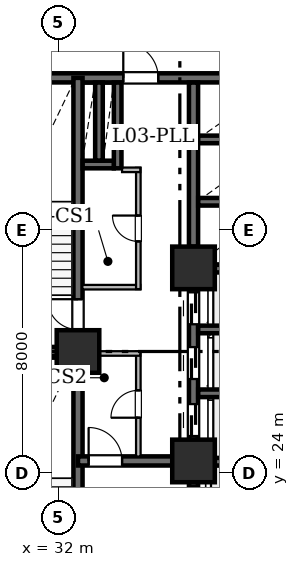
"""IFC4 building model, lengths in metres.
Left out: names, types, materials, properties, quantities, classifications, styles, units other than length and angle.
Written with IfcOpenShell. Run it as: python <this file> out.ifc"""

import sys

from ifc_helpers import new_model, si_unit, direction, frame, frame_2d, origin, origin_2d, place, context, subcontext, project, spatial, rectangle, hollow_rectangle, extrude, element, fill, save


model = new_model("IFC4")
c1 = context("Model", 3, precision=1e-05, world=origin(), true_north=direction((0.0, 1.0)))
c2 = subcontext(c1, "Body", "Model", "MODEL_VIEW")
j1 = project(units=[si_unit("LENGTHUNIT", "METRE"), si_unit("PLANEANGLEUNIT", "RADIAN")], contexts=[c1])
p1 = place(None, origin())
s1 = spatial("IfcSite", under=j1, at=p1, CompositionType="ELEMENT")
p2 = place(p1, origin())
s2 = spatial("IfcBuilding", under=s1, at=p2, CompositionType="ELEMENT")
p3 = place(p2, frame((0.0, 0.0, 16.2)))
s3 = spatial("IfcBuildingStorey", under=s2, at=p3, CompositionType="ELEMENT", Elevation=16.2)
for number, where, z_axis, x_axis in (
    (1, (32.65, 28.0, 0.0), (0.0, 0.0, 1.0), (1.0, 0.0, 0.0)),
    (2, (36.45, 24.4, 0.0), (0.0, 0.0, 1.0), (1.0, 0.0, 0.0)),
    (3, (36.45, 30.75, 0.0), (0.0, 0.0, 1.0), (1.0, 0.0, 0.0)),
):
    element("IfcColumn", number, at=place(p3, frame(where, z_axis=z_axis, x_axis=x_axis)), inside=s3, PredefinedType="COLUMN", context=c2, shape_type="SweptSolid", body=[
        extrude(hollow_rectangle(XDim=1.4, YDim=1.4, WallThickness=0.07, at=origin_2d()), origin(), (0.0, 0.0, 1.0), 4.2),
    ])
p4 = place(p3, frame((29.0, 37.0, 0.0), z_axis=(0.0, 0.0, 1.0), x_axis=(1.0, 0.0, 0.0)))
e4 = element("IfcWall", 4, at=p4, inside=s3, PredefinedType="SHEAR", context=c2, shape_type="SweptSolid", body=[
    extrude(rectangle(XDim=10.4, YDim=0.3, at=frame_2d((5.2, 0.0))), origin(), (0.0, 0.0, 1.0), 3.92),
])
p5 = place(p4, frame((5.14, 0.0, 0.0)))
e5 = element("IfcOpeningElement", 5, at=p5, cuts=e4, PredefinedType="OPENING", context=c2, shape_type="SweptSolid", body=[
    extrude(rectangle(XDim=1.15, YDim=2.2, at=frame_2d((0.575, 1.1))), frame((0.0, 0.16, 0.0), z_axis=(0.0, -1.0, 0.0), x_axis=(1.0, 0.0, 0.0)), (0.0, 0.0, 1.0), 0.32),
])
p6 = place(p3, frame((32.65, 19.0, 0.0), z_axis=(0.0, 0.0, 1.0), x_axis=(0.0, 1.0, 0.0)))
e6 = element("IfcWall", 6, at=p6, inside=s3, PredefinedType="SHEAR", context=c2, shape_type="SweptSolid", body=[
    extrude(rectangle(XDim=9.0, YDim=0.3, at=frame_2d((4.5, 0.0))), origin(), (0.0, 0.0, 1.0), 3.92),
])
p7 = place(p6, frame((0.72, 0.0, 0.0)))
e7 = element("IfcOpeningElement", 7, at=p7, cuts=e6, PredefinedType="OPENING", context=c2, shape_type="SweptSolid", body=[
    extrude(rectangle(XDim=1.0, YDim=2.15, at=frame_2d((0.5, 1.075))), frame((0.0, 0.16, 0.0), z_axis=(0.0, -1.0, 0.0), x_axis=(1.0, 0.0, 0.0)), (0.0, 0.0, 1.0), 0.32),
])
p8 = place(p3, frame((32.65, 28.0, 0.0), z_axis=(0.0, 0.0, 1.0), x_axis=(0.0, 1.0, 0.0)))
e8 = element("IfcWall", 8, at=p8, inside=s3, PredefinedType="SHEAR", context=c2, shape_type="SweptSolid", body=[
    extrude(rectangle(XDim=9.0, YDim=0.3, at=frame_2d((4.5, 0.0))), origin(), (0.0, 0.0, 1.0), 3.92),
])
p9 = place(p8, frame((0.72, 0.0, 0.0)))
e9 = element("IfcOpeningElement", 9, at=p9, cuts=e8, PredefinedType="OPENING", context=c2, shape_type="SweptSolid", body=[
    extrude(rectangle(XDim=1.0, YDim=2.15, at=frame_2d((0.5, 1.075))), frame((0.0, 0.16, 0.0), z_axis=(0.0, -1.0, 0.0), x_axis=(1.0, 0.0, 0.0)), (0.0, 0.0, 1.0), 0.32),
])
p10 = place(p3, frame((29.0, 28.0, 0.0), z_axis=(0.0, 0.0, 1.0), x_axis=(1.0, 0.0, 0.0)))
e10 = element("IfcWall", 10, at=p10, inside=s3, PredefinedType="SHEAR", context=c2, shape_type="SweptSolid", body=[
    extrude(rectangle(XDim=3.65, YDim=0.3, at=frame_2d((1.825, 0.0))), origin(), (0.0, 0.0, 1.0), 3.92),
])
p11 = place(p3, frame((32.65, 24.4, 0.0), z_axis=(0.0, 0.0, 1.0), x_axis=(1.0, 0.0, 0.0)))
e11 = element("IfcWall", 11, at=p11, inside=s3, PredefinedType="SHEAR", context=c2, shape_type="SweptSolid", body=[
    extrude(rectangle(XDim=3.8, YDim=0.3, at=frame_2d((1.9, 0.0))), origin(), (0.0, 0.0, 1.0), 3.92),
])
p12 = place(p11, frame((0.35, 0.0, 0.0)))
e12 = element("IfcOpeningElement", 12, at=p12, cuts=e11, PredefinedType="OPENING", context=c2, shape_type="SweptSolid", body=[
    extrude(rectangle(XDim=1.1, YDim=2.15, at=frame_2d((0.55, 1.075))), frame((0.0, 0.16, 0.0), z_axis=(0.0, -1.0, 0.0), x_axis=(1.0, 0.0, 0.0)), (0.0, 0.0, 1.0), 0.32),
])
p13 = place(p3, frame((36.45, 19.154, 0.0), z_axis=(0.0, 0.0, 1.0), x_axis=(0.0, 1.0, 0.0)))
e13 = element("IfcWall", 13, at=p13, inside=s3, PredefinedType="SHEAR", context=c2, shape_type="SweptSolid", body=[
    extrude(rectangle(XDim=4.546, YDim=0.3, at=frame_2d((2.273, 0.0))), origin(), (0.0, 0.0, 1.0), 3.92),
])
p14 = place(p13, frame((0.696, 0.0, 0.0)))
e14 = element("IfcOpeningElement", 14, at=p14, cuts=e13, PredefinedType="OPENING", context=c2, shape_type="SweptSolid", body=[
    extrude(rectangle(XDim=1.1, YDim=2.15, at=frame_2d((0.55, 1.075))), frame((0.0, 0.16, 0.0), z_axis=(0.0, -1.0, 0.0), x_axis=(1.0, 0.0, 0.0)), (0.0, 0.0, 1.0), 0.32),
])
p15 = place(p13, frame((3.316, 0.0, 0.0)))
e15 = element("IfcOpeningElement", 15, at=p15, cuts=e13, PredefinedType="OPENING", context=c2, shape_type="SweptSolid", body=[
    extrude(rectangle(XDim=1.1, YDim=2.15, at=frame_2d((0.55, 1.075))), frame((0.0, 0.16, 0.0), z_axis=(0.0, -1.0, 0.0), x_axis=(1.0, 0.0, 0.0)), (0.0, 0.0, 1.0), 0.32),
])
p16 = place(p3, frame((36.45, 25.1, 0.0), z_axis=(0.0, 0.0, 1.0), x_axis=(0.0, 1.0, 0.0)))
e16 = element("IfcWall", 16, at=p16, inside=s3, PredefinedType="SHEAR", context=c2, shape_type="SweptSolid", body=[
    extrude(rectangle(XDim=4.95, YDim=0.3, at=frame_2d((2.475, 0.0))), origin(), (0.0, 0.0, 1.0), 3.92),
])
p17 = place(p16, frame((0.12, 0.0, 0.0)))
e17 = element("IfcOpeningElement", 17, at=p17, cuts=e16, PredefinedType="OPENING", context=c2, shape_type="SweptSolid", body=[
    extrude(rectangle(XDim=1.05, YDim=2.15, at=frame_2d((0.525, 1.075))), frame((0.0, 0.16, 0.0), z_axis=(0.0, -1.0, 0.0), x_axis=(1.0, 0.0, 0.0)), (0.0, 0.0, 1.0), 0.32),
])
p18 = place(p16, frame((1.995, 0.0, 0.0)))
e18 = element("IfcOpeningElement", 18, at=p18, cuts=e16, PredefinedType="OPENING", context=c2, shape_type="SweptSolid", body=[
    extrude(rectangle(XDim=1.05, YDim=2.15, at=frame_2d((0.525, 1.075))), frame((0.0, 0.16, 0.0), z_axis=(0.0, -1.0, 0.0), x_axis=(1.0, 0.0, 0.0)), (0.0, 0.0, 1.0), 0.32),
])
p19 = place(p16, frame((3.795, 0.0, 0.0)))
e19 = element("IfcOpeningElement", 19, at=p19, cuts=e16, PredefinedType="OPENING", context=c2, shape_type="SweptSolid", body=[
    extrude(rectangle(XDim=1.05, YDim=2.15, at=frame_2d((0.525, 1.075))), frame((0.0, 0.16, 0.0), z_axis=(0.0, -1.0, 0.0), x_axis=(1.0, 0.0, 0.0)), (0.0, 0.0, 1.0), 0.32),
])
p20 = place(p3, frame((36.45, 31.45, 0.0), z_axis=(0.0, 0.0, 1.0), x_axis=(0.0, 1.0, 0.0)))
e20 = element("IfcWall", 20, at=p20, inside=s3, PredefinedType="SHEAR", context=c2, shape_type="SweptSolid", body=[
    extrude(rectangle(XDim=5.396, YDim=0.3, at=frame_2d((2.698, 0.0))), origin(), (0.0, 0.0, 1.0), 3.92),
])
for number, where, z_axis, x_axis in (
    (21, (36.604, 24.375, 0.0), (0.0, 0.0, 1.0), (1.0, 0.0, 0.0)),
    (22, (36.604, 26.625, 0.0), (0.0, 0.0, 1.0), (1.0, 0.0, 0.0)),
    (23, (36.604, 28.725, 0.0), (0.0, 0.0, 1.0), (1.0, 0.0, 0.0)),
    (24, (36.604, 30.725, 0.0), (0.0, 0.0, 1.0), (1.0, 0.0, 0.0)),
    (25, (36.604, 32.925, 0.0), (0.0, 0.0, 1.0), (1.0, 0.0, 0.0)),
    (26, (36.604, 34.975, 0.0), (0.0, 0.0, 1.0), (1.0, 0.0, 0.0)),
):
    element("IfcWall", number, at=place(p3, frame(where, z_axis=z_axis, x_axis=x_axis)), inside=s3, PredefinedType="SHEAR", context=c2, shape_type="SweptSolid", body=[
        extrude(rectangle(XDim=2.642, YDim=0.25, at=frame_2d((1.321, 0.0))), origin(), (0.0, 0.0, 1.0), 3.92),
    ])
p21 = place(p3, frame((33.955, 34.025, 0.0), z_axis=(0.0, 0.0, 1.0), x_axis=(0.0, 1.0, 0.0)))
e27 = element("IfcWall", 27, at=p21, inside=s3, PredefinedType="SHEAR", context=c2, shape_type="SweptSolid", body=[
    extrude(rectangle(XDim=2.821, YDim=0.25, at=frame_2d((1.411, 0.0))), origin(), (0.0, 0.0, 1.0), 3.92),
])
p22 = place(p3, frame((32.804, 34.15, 0.0), z_axis=(0.0, 0.0, 1.0), x_axis=(1.0, 0.0, 0.0)))
e28 = element("IfcWall", 28, at=p22, inside=s3, PredefinedType="SHEAR", context=c2, shape_type="SweptSolid", body=[
    extrude(rectangle(XDim=1.022, YDim=0.25, at=frame_2d((0.511, 0.0))), origin(), (0.0, 0.0, 1.0), 3.92),
])
p23 = place(p3, frame((33.34, 34.279, 0.0), z_axis=(0.0, 0.0, 1.0), x_axis=(0.0, 1.0, 0.0)))
e29 = element("IfcWall", 29, at=p23, inside=s3, PredefinedType="SHEAR", context=c2, shape_type="SweptSolid", body=[
    extrude(rectangle(XDim=2.567, YDim=0.25, at=frame_2d((1.283, 0.0))), origin(), (0.0, 0.0, 1.0), 3.92),
])
p24 = place(p3, frame((32.794, 30.115, 0.0), z_axis=(0.0, 0.0, 1.0), x_axis=(1.0, 0.0, 0.0)))
e30 = element("IfcWall", 30, at=p24, inside=s3, PredefinedType="STANDARD", context=c2, shape_type="SweptSolid", body=[
    extrude(rectangle(XDim=1.906, YDim=0.15, at=frame_2d((0.953, 0.0))), origin(), (0.0, 0.0, 1.0), 3.377),
])
p25 = place(p3, frame((34.635, 30.052, 0.0), z_axis=(0.0, 0.0, 1.0), x_axis=(0.0, 1.0, 0.0)))
e31 = element("IfcWall", 31, at=p25, inside=s3, PredefinedType="STANDARD", context=c2, shape_type="SweptSolid", body=[
    extrude(rectangle(XDim=3.988, YDim=0.15, at=frame_2d((1.994, 0.0))), origin(), (0.0, 0.0, 1.0), 3.92),
])
p26 = place(p25, frame((1.569, 0.0, 0.0)))
e32 = element("IfcOpeningElement", 32, at=p26, cuts=e31, PredefinedType="OPENING", context=c2, shape_type="SweptSolid", body=[
    extrude(rectangle(XDim=0.85, YDim=2.1, at=frame_2d((0.425, 1.05))), frame((0.0, 0.085, 0.0), z_axis=(0.0, -1.0, 0.0), x_axis=(1.0, 0.0, 0.0)), (0.0, 0.0, 1.0), 0.17),
])
p27 = place(p3, frame((34.7, 33.975, 0.0), z_axis=(0.0, 0.0, 1.0), x_axis=(-1.0, 0.0, 0.0)))
e33 = element("IfcWall", 33, at=p27, inside=s3, PredefinedType="STANDARD", context=c2, shape_type="SweptSolid", body=[
    extrude(rectangle(XDim=0.6, YDim=0.15, at=frame_2d((0.3, 0.0))), origin(), (0.0, 0.0, 1.0), 3.92),
])
p28 = place(p3, frame((34.635, 24.544, 0.0), z_axis=(0.0, 0.0, 1.0), x_axis=(0.0, 1.0, 0.0)))
e34 = element("IfcWall", 34, at=p28, inside=s3, PredefinedType="STANDARD", context=c2, shape_type="SweptSolid", body=[
    extrude(rectangle(XDim=3.456, YDim=0.15, at=frame_2d((1.728, 0.0))), origin(), (0.0, 0.0, 1.0), 3.92),
])
p29 = place(p28, frame((1.278, 0.0, 0.0)))
e35 = element("IfcOpeningElement", 35, at=p29, cuts=e34, PredefinedType="OPENING", context=c2, shape_type="SweptSolid", body=[
    extrude(rectangle(XDim=0.9, YDim=2.1, at=frame_2d((0.45, 1.05))), frame((0.0, 0.085, 0.0), z_axis=(0.0, -1.0, 0.0), x_axis=(1.0, 0.0, 0.0)), (0.0, 0.0, 1.0), 0.17),
])
p30 = place(p3, frame((34.7, 27.935, 0.0), z_axis=(0.0, 0.0, 1.0), x_axis=(-1.0, 0.0, 0.0)))
e36 = element("IfcWall", 36, at=p30, inside=s3, PredefinedType="STANDARD", context=c2, shape_type="SweptSolid", body=[
    extrude(rectangle(XDim=1.906, YDim=0.15, at=frame_2d((0.953, 0.0))), origin(), (0.0, 0.0, 1.0), 3.377),
])
p31 = place(p9, origin())
e37 = element("IfcDoor", 37, at=p31, inside=s3, OperationType="SINGLE_SWING_RIGHT", PredefinedType="DOOR", context=c2, shape_type="SweptSolid", body=[
    extrude(rectangle(XDim=1.0, YDim=2.15, at=frame_2d((0.5, 1.075))), frame((0.0, 0.025, 0.0), z_axis=(0.0, -1.0, 0.0), x_axis=(1.0, 0.0, 0.0)), (0.0, 0.0, 1.0), 0.05),
])
fill(e9, e37)
p32 = place(p12, origin())
e38 = element("IfcDoor", 38, at=p32, inside=s3, OperationType="SINGLE_SWING_LEFT", PredefinedType="DOOR", context=c2, shape_type="SweptSolid", body=[
    extrude(rectangle(XDim=1.1, YDim=2.15, at=frame_2d((0.55, 1.075))), frame((0.0, 0.025, 0.0), z_axis=(0.0, -1.0, 0.0), x_axis=(1.0, 0.0, 0.0)), (0.0, 0.0, 1.0), 0.05),
])
fill(e12, e38)
p33 = place(p5, origin())
e39 = element("IfcDoor", 39, at=p33, inside=s3, OperationType="SINGLE_SWING_LEFT", PredefinedType="DOOR", context=c2, shape_type="SweptSolid", body=[
    extrude(rectangle(XDim=1.15, YDim=2.2, at=frame_2d((0.575, 1.1))), frame((0.0, 0.025, 0.0), z_axis=(0.0, -1.0, 0.0), x_axis=(1.0, 0.0, 0.0)), (0.0, 0.0, 1.0), 0.05),
])
fill(e5, e39)
p34 = place(p15, origin())
e40 = element("IfcDoor", 40, at=p34, inside=s3, OperationType="SLIDING_TO_LEFT", PredefinedType="DOOR", context=c2, shape_type="SweptSolid", body=[
    extrude(rectangle(XDim=1.1, YDim=2.15, at=frame_2d((0.55, 1.075))), frame((0.0, 0.025, 0.0), z_axis=(0.0, -1.0, 0.0), x_axis=(1.0, 0.0, 0.0)), (0.0, 0.0, 1.0), 0.05),
])
fill(e15, e40)
p35 = place(p17, origin())
e41 = element("IfcDoor", 41, at=p35, inside=s3, OperationType="SLIDING_TO_LEFT", PredefinedType="DOOR", context=c2, shape_type="SweptSolid", body=[
    extrude(rectangle(XDim=1.05, YDim=2.15, at=frame_2d((0.525, 1.075))), frame((0.0, 0.025, 0.0), z_axis=(0.0, -1.0, 0.0), x_axis=(1.0, 0.0, 0.0)), (0.0, 0.0, 1.0), 0.05),
])
fill(e17, e41)
p36 = place(p18, origin())
e42 = element("IfcDoor", 42, at=p36, inside=s3, OperationType="SLIDING_TO_LEFT", PredefinedType="DOOR", context=c2, shape_type="SweptSolid", body=[
    extrude(rectangle(XDim=1.05, YDim=2.15, at=frame_2d((0.525, 1.075))), frame((0.0, 0.025, 0.0), z_axis=(0.0, -1.0, 0.0), x_axis=(1.0, 0.0, 0.0)), (0.0, 0.0, 1.0), 0.05),
])
fill(e18, e42)
p37 = place(p19, origin())
e43 = element("IfcDoor", 43, at=p37, inside=s3, OperationType="SLIDING_TO_LEFT", PredefinedType="DOOR", context=c2, shape_type="SweptSolid", body=[
    extrude(rectangle(XDim=1.05, YDim=2.15, at=frame_2d((0.525, 1.075))), frame((0.0, 0.025, 0.0), z_axis=(0.0, -1.0, 0.0), x_axis=(1.0, 0.0, 0.0)), (0.0, 0.0, 1.0), 0.05),
])
fill(e19, e43)
p38 = place(p26, origin())
e44 = element("IfcDoor", 44, at=p38, inside=s3, OperationType="SINGLE_SWING_RIGHT", PredefinedType="DOOR", context=c2, shape_type="SweptSolid", body=[
    extrude(rectangle(XDim=0.85, YDim=2.1, at=frame_2d((0.425, 1.05))), frame((0.0, 0.025, 0.0), z_axis=(0.0, -1.0, 0.0), x_axis=(1.0, 0.0, 0.0)), (0.0, 0.0, 1.0), 0.05),
])
fill(e32, e44)
p39 = place(p29, origin())
e45 = element("IfcDoor", 45, at=p39, inside=s3, OperationType="SINGLE_SWING_LEFT", PredefinedType="DOOR", context=c2, shape_type="SweptSolid", body=[
    extrude(rectangle(XDim=0.9, YDim=2.1, at=frame_2d((0.45, 1.05))), frame((0.0, 0.025, 0.0), z_axis=(0.0, -1.0, 0.0), x_axis=(1.0, 0.0, 0.0)), (0.0, 0.0, 1.0), 0.05),
])
fill(e35, e45)
save(model, sys.argv[1])
